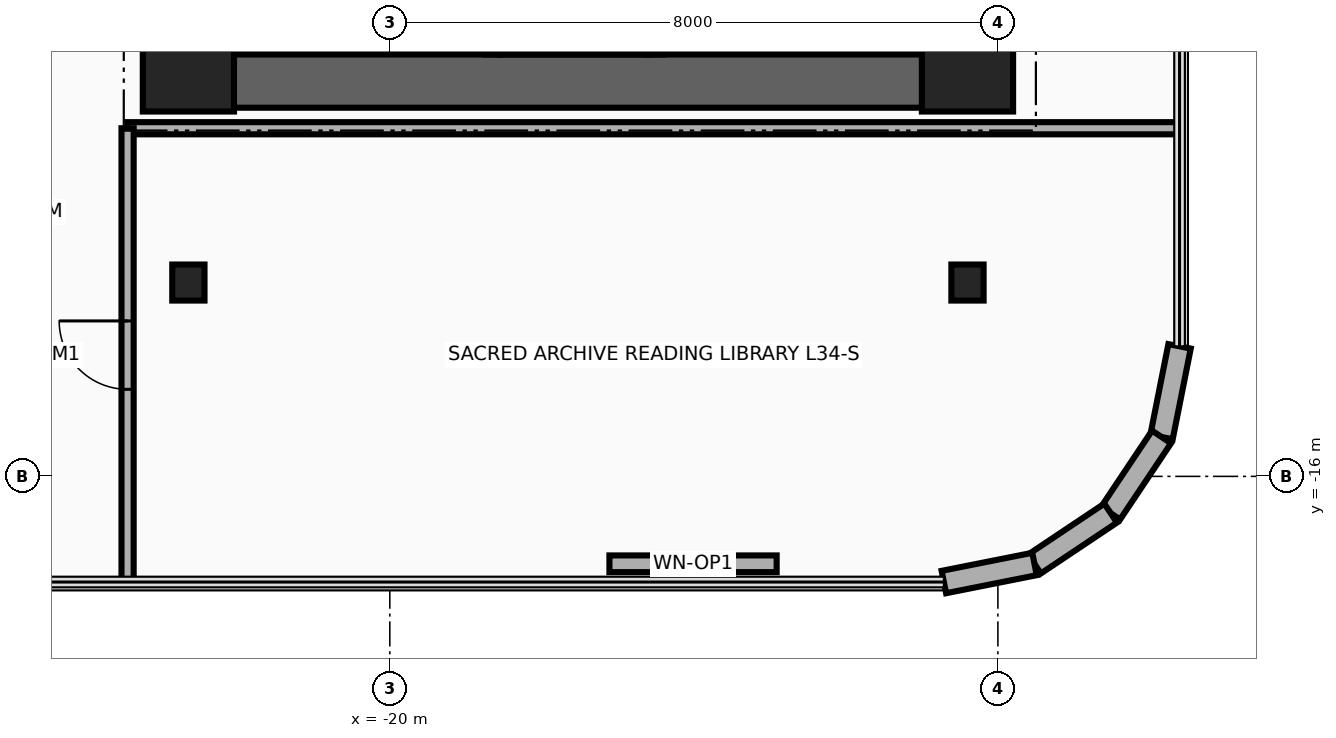
"""IFC4 building model, lengths in metres.
Left out: names, types, materials, properties, quantities, classifications, styles, units other than length and angle.
Written with IfcOpenShell. Run it as: python <this file> out.ifc"""

import sys

from ifc_helpers import new_model, si_unit, direction, frame, frame_2d, origin, origin_2d, place, context, subcontext, project, spatial, rectangle, i_section, extrude, source, transform, mapped, element, fill, save


model = new_model("IFC4")
c1 = context("Model", 3, precision=1e-05, world=origin(), true_north=direction((0.0, 1.0)))
c2 = subcontext(c1, "Body", "Model", "MODEL_VIEW")
j1 = project(units=[si_unit("LENGTHUNIT", "METRE"), si_unit("PLANEANGLEUNIT", "RADIAN")], contexts=[c1])
p1 = place(None, origin())
s1 = spatial("IfcSite", under=j1, at=p1, CompositionType="ELEMENT")
p2 = place(p1, origin())
s2 = spatial("IfcBuilding", under=s1, at=p2, CompositionType="ELEMENT")
p3 = place(p2, frame((0.0, 0.0, 135.3)))
s3 = spatial("IfcBuildingStorey", under=s2, at=p3, CompositionType="ELEMENT", Elevation=135.3)
for number, where, z_axis, x_axis in (
    (1, (-22.16, -10.45, 0.0), (0.0, 0.0, 1.0), (0.0, 1.0, 0.0)),
    (2, (-18.83, -10.45, 0.0), (0.0, 0.0, 1.0), (0.0, 1.0, 0.0)),
):
    element("IfcWall", number, at=place(p3, frame(where, z_axis=z_axis, x_axis=x_axis)), inside=s3, PredefinedType="SHEAR", context=c2, shape_type="SweptSolid", body=[
        extrude(rectangle(XDim=8.67, YDim=0.22, at=frame_2d((4.335, 0.0))), origin(), (0.0, 0.0, 1.0), 3.46),
    ])
p4 = place(p3, frame((-22.65, -11.15, 0.0), z_axis=(0.0, 0.0, 1.0), x_axis=(0.0, 1.0, 0.0)))
e3 = element("IfcWall", 3, at=p4, inside=s3, PredefinedType="SHEAR", context=c2, shape_type="SweptSolid", body=[
    extrude(rectangle(XDim=22.3, YDim=0.7, at=frame_2d((11.15, 0.0))), origin(), (0.0, 0.0, 1.0), 3.46),
])
p5 = place(p3, frame((-22.65, -10.8, 0.0), z_axis=(0.0, 0.0, 1.0), x_axis=(1.0, 0.0, 0.0)))
e4 = element("IfcWall", 4, at=p5, inside=s3, PredefinedType="SHEAR", context=c2, shape_type="SweptSolid", body=[
    extrude(rectangle(XDim=10.25, YDim=0.7, at=frame_2d((5.125, 0.0))), origin(), (0.0, 0.0, 1.0), 3.46),
])
m1 = source(origin(), c2, "Body", "SweptSolid", [
    extrude(rectangle(XDim=1.2, YDim=1.2, at=origin_2d()), origin(), (0.0, 0.0, 1.0), 3.7),
])
for number, where, z_axis, x_axis in (
    (5, (-22.65, -10.6, 0.0), (0.0, 0.0, 1.0), (1.0, 0.0, 0.0)),
    (6, (-12.4, -10.6, 0.0), (0.0, 0.0, 1.0), (1.0, 0.0, 0.0)),
):
    element("IfcColumn", number, at=place(p3, frame(where, z_axis=z_axis, x_axis=x_axis)), inside=s3, PredefinedType="COLUMN", context=c2, shape_type="MappedRepresentation", body=[
        mapped(m1, transform((0.0, 0.0, 0.0), x_axis=(1.0, 0.0, 0.0), y_axis=(0.0, 1.0, 0.0), z_axis=(0.0, 0.0, 1.0), scale=1.0)),
    ])
m2 = source(origin(), c2, "Body", "SweptSolid", [
    extrude(i_section(OverallWidth=0.424, OverallDepth=0.474, WebThickness=0.048, FlangeThickness=0.077, at=origin_2d()), origin(), (0.0, 0.0, 1.0), 3.7),
])
for number, where, z_axis, x_axis in (
    (7, (-22.65, -13.45, 0.0), (0.0, 0.0, 1.0), (1.0, 0.0, 0.0)),
    (8, (-12.4, -13.45, 0.0), (0.0, 0.0, 1.0), (1.0, 0.0, 0.0)),
):
    element("IfcColumn", number, at=place(p3, frame(where, z_axis=z_axis, x_axis=x_axis)), inside=s3, PredefinedType="COLUMN", context=c2, shape_type="MappedRepresentation", body=[
        mapped(m2, transform((0.0, 0.0, 0.0), x_axis=(1.0, 0.0, 0.0), y_axis=(0.0, 1.0, 0.0), z_axis=(0.0, 0.0, 1.0), scale=1.0)),
    ])
p6 = place(p3, frame((-9.61, -14.289, 0.0), z_axis=(0.0, 0.0, 1.0), x_axis=(-0.194996050505, -0.980804027463, 0.0)))
e9 = element("IfcWall", 9, at=p6, inside=s3, PredefinedType="SOLIDWALL", context=c2, shape_type="SweptSolid", body=[
    extrude(rectangle(XDim=1.216, YDim=0.3, at=frame_2d((0.608, 0.0))), origin(), (0.0, 0.0, 1.0), 3.46),
])
for number, where, z_axis, x_axis in (
    (10, (-9.847, -15.482, 0.0), (0.0, 0.0, 1.0), (-0.556, -0.831, 0.0)),
    (11, (-10.517, -16.483, 0.0), (0.0, 0.0, 1.0), (-0.831, -0.556, 0.0)),
):
    element("IfcWall", number, at=place(p3, frame(where, z_axis=z_axis, x_axis=x_axis)), inside=s3, PredefinedType="SOLIDWALL", context=c2, shape_type="SweptSolid", body=[
        extrude(rectangle(XDim=1.205, YDim=0.3, at=frame_2d((0.603, 0.0))), origin(), (0.0, 0.0, 1.0), 3.46),
    ])
p7 = place(p3, frame((-11.518, -17.153, 0.0), z_axis=(0.0, 0.0, 1.0), x_axis=(-0.980804027463, -0.194996050505, 0.0)))
e12 = element("IfcWall", 12, at=p7, inside=s3, PredefinedType="SOLIDWALL", context=c2, shape_type="SweptSolid", body=[
    extrude(rectangle(XDim=1.216, YDim=0.3, at=frame_2d((0.608, 0.0))), origin(), (0.0, 0.0, 1.0), 3.46),
])
p8 = place(p3, frame((-14.911, -17.15, 0.0), z_axis=(0.0, 0.0, 1.0), x_axis=(-1.0, 0.0, 0.0)))
e13 = element("IfcWall", 13, at=p8, inside=s3, PredefinedType="SOLIDWALL", context=c2, shape_type="SweptSolid", body=[
    extrude(rectangle(XDim=2.2, YDim=0.22, at=frame_2d((1.1, 0.0))), origin(), (0.0, 0.0, 1.0), 3.46),
])
p9 = place(p8, frame((0.65, 0.0, 0.95)))
e14 = element("IfcOpeningElement", 14, at=p9, cuts=e13, PredefinedType="OPENING", context=c2, shape_type="SweptSolid", body=[
    extrude(rectangle(XDim=0.9, YDim=1.3, at=frame_2d((0.45, 0.65))), frame((0.0, 0.125, 0.0), z_axis=(0.0, -1.0, 0.0), x_axis=(1.0, 0.0, 0.0)), (0.0, 0.0, 1.0), 0.25),
])
for number, where, z_axis, x_axis in (
    (15, (-18.65, -10.45, 0.0), (0.0, 0.0, 1.0), (0.0, 1.0, 0.0)),
    (16, (-16.5, -10.45, 0.0), (0.0, 0.0, 1.0), (0.0, 1.0, 0.0)),
):
    element("IfcWall", number, at=place(p3, frame(where, z_axis=z_axis, x_axis=x_axis)), inside=s3, PredefinedType="MOVABLE", context=c2, shape_type="SweptSolid", body=[
        extrude(rectangle(XDim=2.35, YDim=0.2, at=frame_2d((1.175, 0.0))), origin(), (0.0, 0.0, 1.0), 2.666),
    ])
p10 = place(p3, frame((-18.55, -10.35, 0.0), z_axis=(0.0, 0.0, 1.0), x_axis=(1.0, 0.0, 0.0)))
e17 = element("IfcWall", 17, at=p10, inside=s3, PredefinedType="MOVABLE", context=c2, shape_type="SweptSolid", body=[
    extrude(rectangle(XDim=1.95, YDim=0.2, at=frame_2d((0.975, 0.0))), origin(), (0.0, 0.0, 1.0), 2.666),
])
p11 = place(p3, frame((-23.45, -11.42, 0.0), z_axis=(0.0, 0.0, 1.0), x_axis=(1.0, 0.0, 0.0)))
e18 = element("IfcWall", 18, at=p11, inside=s3, PredefinedType="PARTITIONING", context=c2, shape_type="SweptSolid", body=[
    extrude(rectangle(XDim=13.84, YDim=0.16, at=frame_2d((6.92, 0.0))), origin(), (0.0, 0.0, 1.0), 2.834),
])
p12 = place(p3, frame((-23.45, -17.39, 0.0), z_axis=(0.0, 0.0, 1.0), x_axis=(0.0, 1.0, 0.0)))
e19 = element("IfcWall", 19, at=p12, inside=s3, PredefinedType="PARTITIONING", context=c2, shape_type="SweptSolid", body=[
    extrude(rectangle(XDim=5.97, YDim=0.16, at=frame_2d((2.985, 0.0))), origin(), (0.0, 0.0, 1.0), 3.46),
])
p13 = place(p12, frame((2.535, 0.0, 0.0)))
e20 = element("IfcOpeningElement", 20, at=p13, cuts=e19, PredefinedType="OPENING", context=c2, shape_type="SweptSolid", body=[
    extrude(rectangle(XDim=0.9, YDim=2.1, at=frame_2d((0.45, 1.05))), frame((0.0, 0.095, 0.0), z_axis=(0.0, -1.0, 0.0), x_axis=(1.0, 0.0, 0.0)), (0.0, 0.0, 1.0), 0.19),
])
p14 = place(p9, origin())
e21 = element("IfcWindow", 21, at=p14, inside=s3, PartitioningType="SINGLE_PANEL", PredefinedType="WINDOW", context=c2, shape_type="SweptSolid", body=[
    extrude(rectangle(XDim=0.9, YDim=1.3, at=frame_2d((0.45, 0.65))), frame((0.0, 0.03, 0.0), z_axis=(0.0, -1.0, 0.0), x_axis=(1.0, 0.0, 0.0)), (0.0, 0.0, 1.0), 0.06),
])
fill(e14, e21)
p15 = place(p13, origin())
e22 = element("IfcDoor", 22, at=p15, inside=s3, OperationType="SINGLE_SWING_RIGHT", PredefinedType="DOOR", context=c2, shape_type="SweptSolid", body=[
    extrude(rectangle(XDim=0.9, YDim=2.1, at=frame_2d((0.45, 1.05))), frame((0.0, 0.025, 0.0), z_axis=(0.0, -1.0, 0.0), x_axis=(1.0, 0.0, 0.0)), (0.0, 0.0, 1.0), 0.05),
])
fill(e20, e22)
save(model, sys.argv[1])
